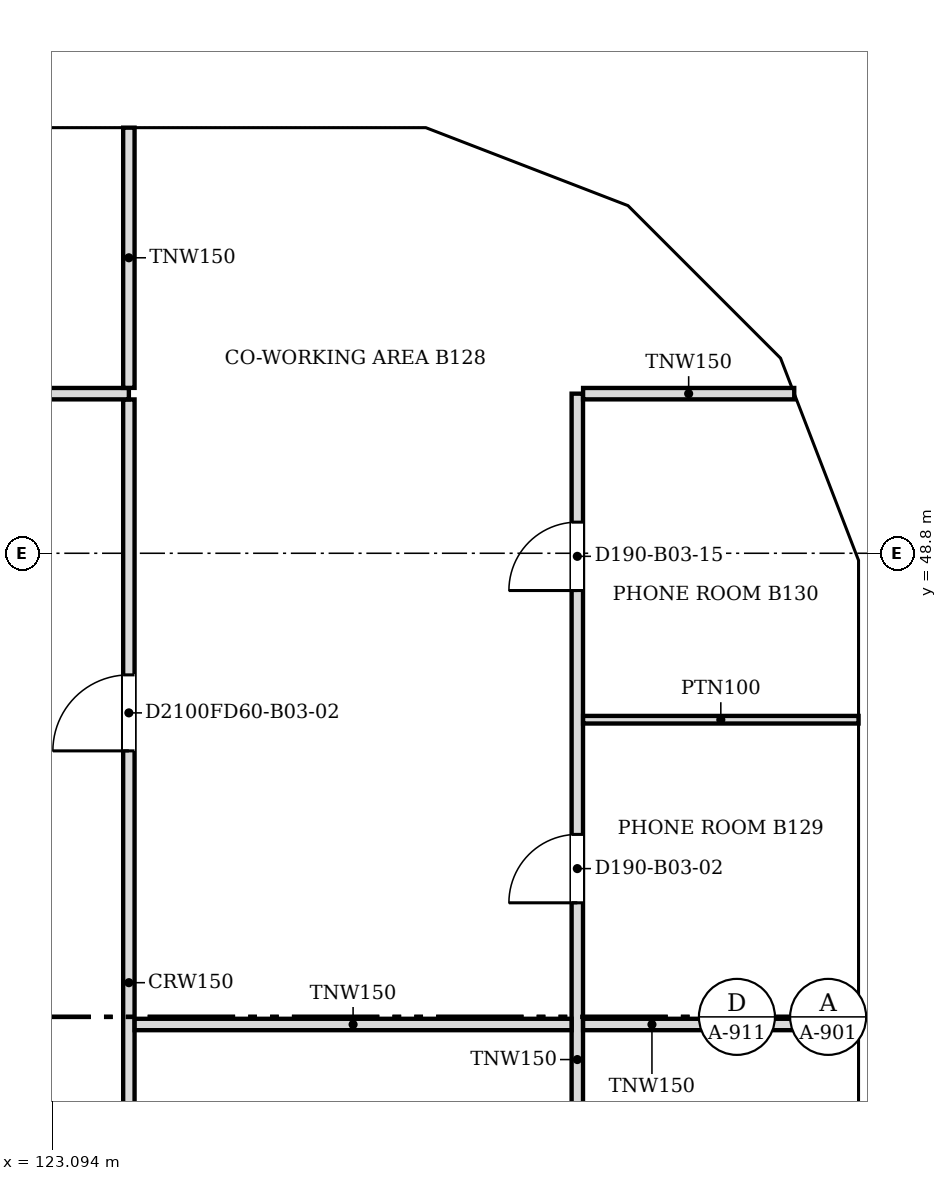
"""IFC4 building model, lengths in metres.
Left out: names, types, materials, properties, quantities, classifications, styles, units other than length and angle.
Written with IfcOpenShell. Run it as: python <this file> out.ifc"""

import sys

from ifc_helpers import new_model, si_unit, direction, frame, frame_2d, origin, place, context, subcontext, project, spatial, polyline, rectangle, outline, extrude, faceted_brep, source, transform, mapped, element, fill, save


model = new_model("IFC4")
c1 = context("Model", 3, precision=1e-05, world=origin(), true_north=direction((0.0, 1.0)))
c2 = subcontext(c1, "Body", "Model", "MODEL_VIEW")
j1 = project(units=[si_unit("LENGTHUNIT", "METRE"), si_unit("PLANEANGLEUNIT", "RADIAN")], contexts=[c1])
p1 = place(None, origin())
s1 = spatial("IfcSite", under=j1, at=p1, CompositionType="ELEMENT")
p2 = place(p1, origin())
s2 = spatial("IfcBuilding", under=s1, at=p2, CompositionType="ELEMENT")
p3 = place(p2, frame((0.0, 0.0, 33.4)))
s3 = spatial("IfcBuildingStorey", under=s2, at=p3, CompositionType="ELEMENT", Elevation=33.4)
m1 = source(origin(), c2, "Body", "Brep", [
    faceted_brep([(3.05, -0.25, 0.0), (6.1, -0.25, 3.8), (6.1, -0.25, 3.8), (3.05, -0.25, 7.6), (0.0, -0.25, 3.8), (0.0, 0.25, 3.8), (3.05, 0.25, 7.6), (6.1, 0.25, 3.8), (6.1, 0.25, 3.8), (3.05, 0.25, 0.0)], [[[0, 1, 2, 3, 4]], [[5, 6, 7, 8, 9]], [[9, 8, 1, 0]], [[7, 6, 3, 2]], [[6, 5, 4, 3]], [[5, 9, 0, 4]], [[1, 8, 7, 2]]]),
])
p4 = place(p3, frame((133.95, 36.6, -3.8), z_axis=(0.0, 0.0, 1.0), x_axis=(0.0, 1.0, 0.0)))
e1 = element("IfcWall", 1, at=p4, inside=s3, PredefinedType="SOLIDWALL", context=c2, shape_type="MappedRepresentation", body=[
    mapped(m1, transform((0.0, 0.0, 0.0), scale=1.0)),
])
m2 = source(origin(), c2, "Body", "SweptSolid", [
    extrude(outline(polyline([(3.05, 0.399), (5.78, 3.8), (3.05, 7.2), (0.321, 3.8), (3.05, 0.399)])), frame((0.0, 0.26, 0.0), z_axis=(0.0, -1.0, 0.0), x_axis=(1.0, 0.0, 0.0)), (0.0, 0.0, 1.0), 0.52),
])
p5 = place(p4, origin())
e2 = element("IfcOpeningElement", 2, at=p5, cuts=e1, PredefinedType="OPENING", context=c2, shape_type="MappedRepresentation", body=[
    mapped(m2, transform((0.0, 0.0, 0.0), scale=1.0)),
])
m3 = source(origin(), c2, "Body", "Brep", [
    faceted_brep([(3.05, -0.25, 0.0), (6.053, -0.25, 3.8), (3.05, -0.25, 7.6), (0.0, -0.25, 3.8), (0.0, 0.25, 3.8), (3.05, 0.25, 7.6), (6.007, 0.25, 3.859), (6.007, 0.25, 3.741), (3.05, 0.25, 0.0), (6.053, 0.0, 3.8)], [[[0, 1, 2, 3]], [[4, 5, 6, 7, 8]], [[8, 7, 9, 1, 0]], [[6, 5, 2, 1, 9]], [[5, 4, 3, 2]], [[4, 8, 0, 3]], [[9, 7, 6]]]),
])
p6 = place(p3, frame((133.95, 42.7, -3.8), z_axis=(0.0, 0.0, 1.0), x_axis=(0.0, 1.0, 0.0)))
e3 = element("IfcWall", 3, at=p6, inside=s3, PredefinedType="SOLIDWALL", context=c2, shape_type="MappedRepresentation", body=[
    mapped(m3, transform((0.0, 0.0, 0.0), scale=1.0)),
])
m4 = source(origin(), c2, "Body", "SweptSolid", [
    extrude(outline(polyline([(3.049, 0.401), (5.735, 3.8), (3.049, 7.199), (0.321, 3.8), (3.049, 0.401)])), frame((0.0, 0.26, 0.0), z_axis=(0.0, -1.0, 0.0), x_axis=(1.0, 0.0, 0.0)), (0.0, 0.0, 1.0), 0.52),
])
p7 = place(p6, origin())
e4 = element("IfcOpeningElement", 4, at=p7, cuts=e3, PredefinedType="OPENING", context=c2, shape_type="MappedRepresentation", body=[
    mapped(m4, transform((0.0, 0.0, 0.0), scale=1.0)),
])
m5 = source(origin(), c2, "Body", "Brep", [
    faceted_brep([(2.95, -0.25, 0.0), (3.003, -0.25, 0.068), (3.003, -0.25, 7.531), (2.95, -0.25, 7.6), (0.0, -0.25, 3.8), (0.047, 0.25, 3.86), (2.898, 0.25, 7.532), (2.898, 0.25, 0.068), (0.047, 0.25, 3.74), (2.95, 0.0, 0.0), (2.95, 0.0, 7.6), (0.0, 0.0, 3.8)], [[[0, 1, 2, 3, 4]], [[5, 6, 7, 8]], [[1, 0, 9]], [[10, 3, 2]], [[6, 5, 11, 4, 3, 10]], [[8, 7, 9, 0, 4, 11]], [[8, 11, 5]], [[1, 9, 7, 6, 10, 2]]]),
])
p8 = place(p3, frame((133.95, 48.753, -3.8), z_axis=(0.0, 0.0, 1.0), x_axis=(-0.359855894603, 0.933007896601, 0.0)))
e5 = element("IfcWall", 5, at=p8, inside=s3, PredefinedType="SOLIDWALL", context=c2, shape_type="MappedRepresentation", body=[
    mapped(m5, transform((0.0, 0.0, 0.0), scale=1.0)),
])
m6 = source(origin(), c2, "Body", "SweptSolid", [
    extrude(outline(polyline([(2.75, 6.935), (0.316, 3.8), (2.75, 0.665), (2.75, 6.935)])), frame((0.0, 0.26, 0.0), z_axis=(0.0, -1.0, 0.0), x_axis=(1.0, 0.0, 0.0)), (0.0, 0.0, 1.0), 0.52),
])
p9 = place(p8, origin())
e6 = element("IfcOpeningElement", 6, at=p9, cuts=e5, PredefinedType="OPENING", context=c2, shape_type="MappedRepresentation", body=[
    mapped(m6, transform((0.0, 0.0, 0.0), scale=1.0)),
])
m7 = source(origin(), c2, "Body", "Brep", [
    faceted_brep([(0.053, -0.25, 0.0), (2.997, -0.25, 3.8), (0.053, -0.25, 7.6), (0.0, -0.25, 7.532), (0.0, -0.25, 0.068), (0.106, 0.25, 7.531), (2.944, 0.25, 3.868), (2.944, 0.25, 3.732), (0.106, 0.25, 0.068), (2.997, 0.0, 3.8), (0.053, 0.0, 0.0), (0.053, 0.0, 7.6)], [[[0, 1, 2, 3, 4]], [[5, 6, 7, 8]], [[8, 7, 9, 1, 0, 10]], [[6, 5, 11, 2, 1, 9]], [[3, 2, 11]], [[10, 0, 4]], [[8, 10, 4, 3, 11, 5]], [[9, 7, 6]]]),
])
p10 = place(p3, frame((132.926, 51.469, -3.8), z_axis=(0.0, 0.0, 1.0), x_axis=(-0.707066050402, 0.707147509625, 0.0)))
e7 = element("IfcWall", 7, at=p10, inside=s3, PredefinedType="SOLIDWALL", context=c2, shape_type="MappedRepresentation", body=[
    mapped(m7, transform((0.0, 0.0, 0.0), scale=1.0)),
])
m8 = source(origin(), c2, "Body", "SweptSolid", [
    extrude(outline(polyline([(0.253, 0.666), (2.681, 3.8), (0.253, 6.934), (0.253, 0.666)])), frame((0.0, 0.26, 0.0), z_axis=(0.0, -1.0, 0.0), x_axis=(1.0, 0.0, 0.0)), (0.0, 0.0, 1.0), 0.52),
])
p11 = place(p10, origin())
e8 = element("IfcOpeningElement", 8, at=p11, cuts=e7, PredefinedType="OPENING", context=c2, shape_type="MappedRepresentation", body=[
    mapped(m8, transform((0.0, 0.0, 0.0), scale=1.0)),
])
m9 = source(origin(), c2, "Body", "Brep", [
    faceted_brep([(2.95, -0.25, 0.0), (2.997, -0.25, 0.059), (2.997, -0.25, 7.541), (2.95, -0.25, 7.6), (0.0, -0.25, 3.8), (0.053, 0.25, 3.868), (2.904, 0.25, 7.54), (2.904, 0.25, 0.06), (0.053, 0.25, 3.732), (2.95, 0.0, 0.0), (2.95, 0.0, 7.6), (0.0, 0.0, 3.8)], [[[0, 1, 2, 3, 4]], [[5, 6, 7, 8]], [[1, 0, 9]], [[10, 3, 2]], [[6, 5, 11, 4, 3, 10]], [[8, 7, 9, 0, 4, 11]], [[8, 11, 5]], [[1, 9, 7, 6, 10, 2]]]),
])
p12 = place(p3, frame((130.806, 53.588, -3.8), z_axis=(0.0, 0.0, 1.0), x_axis=(-0.932990326376, 0.359901446078, 0.0)))
e9 = element("IfcWall", 9, at=p12, inside=s3, PredefinedType="SOLIDWALL", context=c2, shape_type="MappedRepresentation", body=[
    mapped(m9, transform((0.0, 0.0, 0.0), scale=1.0)),
])
p13 = place(p12, origin())
e10 = element("IfcOpeningElement", 10, at=p13, cuts=e9, PredefinedType="OPENING", context=c2, shape_type="MappedRepresentation", body=[
    mapped(m6, transform((0.0, 0.0, 0.0), scale=1.0)),
])
m10 = source(origin(), c2, "Body", "Brep", [
    faceted_brep([(0.047, -0.25, 0.0), (3.05, -0.25, 3.8), (0.047, -0.25, 7.6), (0.0, -0.25, 7.54), (0.0, -0.25, 0.06), (0.093, 0.25, 7.541), (3.05, 0.25, 3.8), (0.093, 0.25, 0.059), (0.047, 0.0, 0.0), (0.047, 0.0, 7.6)], [[[0, 1, 2, 3, 4]], [[5, 6, 7]], [[7, 6, 1, 0, 8]], [[6, 5, 9, 2, 1]], [[3, 2, 9]], [[8, 0, 4]], [[7, 8, 4, 3, 9, 5]]]),
])
p14 = place(p3, frame((128.1, 54.65, -3.8), z_axis=(0.0, 0.0, 1.0), x_axis=(-1.0, 0.0, 0.0)))
e11 = element("IfcWall", 11, at=p14, inside=s3, PredefinedType="SOLIDWALL", context=c2, shape_type="MappedRepresentation", body=[
    mapped(m10, transform((0.0, 0.0, 0.0), scale=1.0)),
])
m11 = source(origin(), c2, "Body", "SweptSolid", [
    extrude(outline(polyline([(0.247, 0.656), (2.731, 3.8), (0.247, 6.944), (0.247, 0.656)])), frame((0.0, 0.26, 0.0), z_axis=(0.0, -1.0, 0.0), x_axis=(1.0, 0.0, 0.0)), (0.0, 0.0, 1.0), 0.52),
])
p15 = place(p14, origin())
e12 = element("IfcOpeningElement", 12, at=p15, cuts=e11, PredefinedType="OPENING", context=c2, shape_type="MappedRepresentation", body=[
    mapped(m11, transform((0.0, 0.0, 0.0), scale=1.0)),
])
m12 = source(origin(), c2, "Body", "SweptSolid", [
    extrude(outline(polyline([(3.05, 0.0), (6.1, 3.8), (3.05, 7.6), (0.0, 3.8), (3.05, 0.0)])), frame((0.0, 0.25, 0.0), z_axis=(0.0, -1.0, 0.0), x_axis=(1.0, 0.0, 0.0)), (0.0, 0.0, 1.0), 0.5),
])
p16 = place(p3, frame((125.05, 54.65, -3.8), z_axis=(0.0, 0.0, 1.0), x_axis=(-1.0, 0.0, 0.0)))
e13 = element("IfcWall", 13, at=p16, inside=s3, PredefinedType="SOLIDWALL", context=c2, shape_type="MappedRepresentation", body=[
    mapped(m12, transform((0.0, 0.0, 0.0), scale=1.0)),
])
p17 = place(p16, origin())
e14 = element("IfcOpeningElement", 14, at=p17, cuts=e13, PredefinedType="OPENING", context=c2, shape_type="MappedRepresentation", body=[
    mapped(m2, transform((0.0, 0.0, 0.0), scale=1.0)),
])
p18 = place(p2, frame((0.0, 0.0, 37.2)))
s4 = spatial("IfcBuildingStorey", under=s2, at=p18, CompositionType="ELEMENT", Elevation=37.2)
m13 = source(origin(), c2, "Body", "SweptSolid", [
    extrude(outline(polyline([(3.05, 0.0), (6.1, 3.8), (3.05, 7.6), (0.0, 3.8), (3.05, 0.0)])), frame((0.0, 0.25, 0.0), z_axis=(0.0, -1.0, 0.0), x_axis=(1.0, 0.0, 0.0)), (0.0, 0.0, 1.0), 0.5),
])
p19 = place(p18, frame((133.95, 39.65, -3.8), z_axis=(0.0, 0.0, 1.0), x_axis=(0.0, 1.0, 0.0)))
e15 = element("IfcWall", 15, at=p19, inside=s4, PredefinedType="SOLIDWALL", context=c2, shape_type="MappedRepresentation", body=[
    mapped(m13, transform((0.0, 0.0, 0.0), scale=1.0)),
])
m14 = source(origin(), c2, "Body", "SweptSolid", [
    extrude(outline(polyline([(3.05, 0.399), (5.78, 3.8), (3.05, 7.201), (0.321, 3.8), (3.05, 0.399)])), frame((0.0, 0.26, 0.0), z_axis=(0.0, -1.0, 0.0), x_axis=(1.0, 0.0, 0.0)), (0.0, 0.0, 1.0), 0.52),
])
p20 = place(p19, origin())
e16 = element("IfcOpeningElement", 16, at=p20, cuts=e15, PredefinedType="OPENING", context=c2, shape_type="MappedRepresentation", body=[
    mapped(m14, transform((0.0, 0.0, 0.0), scale=1.0)),
])
m15 = source(origin(), c2, "Body", "Brep", [
    faceted_brep([(3.003, -0.25, 0.0), (3.05, -0.25, 0.06), (3.05, -0.25, 7.54), (3.003, -0.25, 7.6), (0.0, -0.25, 3.8), (0.0, 0.25, 3.8), (2.957, 0.25, 7.541), (2.957, 0.25, 0.059), (3.003, 0.0, 0.0), (3.003, 0.0, 7.6)], [[[0, 1, 2, 3, 4]], [[5, 6, 7]], [[1, 0, 8]], [[9, 3, 2]], [[6, 5, 4, 3, 9]], [[5, 7, 8, 0, 4]], [[1, 8, 7, 6, 9, 2]]]),
])
p21 = place(p18, frame((133.95, 45.75, -3.8), z_axis=(0.0, 0.0, 1.0), x_axis=(0.0, 1.0, 0.0)))
e17 = element("IfcWall", 17, at=p21, inside=s4, PredefinedType="SOLIDWALL", context=c2, shape_type="MappedRepresentation", body=[
    mapped(m15, transform((0.0, 0.0, 0.0), scale=1.0)),
])
m16 = source(origin(), c2, "Body", "SweptSolid", [
    extrude(outline(polyline([(2.803, 6.944), (0.319, 3.8), (2.803, 0.656), (2.803, 6.944)])), frame((0.0, 0.26, 0.0), z_axis=(0.0, -1.0, 0.0), x_axis=(1.0, 0.0, 0.0)), (0.0, 0.0, 1.0), 0.52),
])
p22 = place(p21, origin())
e18 = element("IfcOpeningElement", 18, at=p22, cuts=e17, PredefinedType="OPENING", context=c2, shape_type="MappedRepresentation", body=[
    mapped(m16, transform((0.0, 0.0, 0.0), scale=1.0)),
])
m17 = source(origin(), c2, "Body", "Brep", [
    faceted_brep([(0.047, -0.25, 0.0), (2.997, -0.25, 3.8), (0.047, -0.25, 7.6), (0.0, -0.25, 7.541), (0.0, -0.25, 0.059), (0.093, 0.25, 7.54), (2.944, 0.25, 3.868), (2.944, 0.25, 3.732), (0.093, 0.25, 0.06), (2.997, 0.0, 3.8), (0.047, 0.0, 0.0), (0.047, 0.0, 7.6)], [[[0, 1, 2, 3, 4]], [[5, 6, 7, 8]], [[8, 7, 9, 1, 0, 10]], [[6, 5, 11, 2, 1, 9]], [[3, 2, 11]], [[10, 0, 4]], [[8, 10, 4, 3, 11, 5]], [[9, 7, 6]]]),
])
p23 = place(p18, frame((133.967, 48.71, -3.8), z_axis=(0.0, 0.0, 1.0), x_axis=(-0.359901446078, 0.932990326376, 0.0)))
e19 = element("IfcWall", 19, at=p23, inside=s4, PredefinedType="SOLIDWALL", context=c2, shape_type="MappedRepresentation", body=[
    mapped(m17, transform((0.0, 0.0, 0.0), scale=1.0)),
])
m18 = source(origin(), c2, "Body", "SweptSolid", [
    extrude(outline(polyline([(0.247, 0.665), (2.681, 3.8), (0.247, 6.935), (0.247, 0.665)])), frame((0.0, 0.26, 0.0), z_axis=(0.0, -1.0, 0.0), x_axis=(1.0, 0.0, 0.0)), (0.0, 0.0, 1.0), 0.52),
])
p24 = place(p23, origin())
e20 = element("IfcOpeningElement", 20, at=p24, cuts=e19, PredefinedType="OPENING", context=c2, shape_type="MappedRepresentation", body=[
    mapped(m18, transform((0.0, 0.0, 0.0), scale=1.0)),
])
m19 = source(origin(), c2, "Body", "Brep", [
    faceted_brep([(2.944, -0.25, 0.0), (2.997, -0.25, 0.068), (2.997, -0.25, 7.532), (2.944, -0.25, 7.6), (0.0, -0.25, 3.8), (0.053, 0.25, 3.868), (2.891, 0.25, 7.532), (2.891, 0.25, 0.068), (0.053, 0.25, 3.732), (2.944, 0.0, 0.0), (2.944, 0.0, 7.6), (0.0, 0.0, 3.8)], [[[0, 1, 2, 3, 4]], [[5, 6, 7, 8]], [[1, 0, 9]], [[10, 3, 2]], [[6, 5, 11, 4, 3, 10]], [[8, 7, 9, 0, 4, 11]], [[8, 11, 5]], [[1, 9, 7, 6, 10, 2]]]),
])
p25 = place(p18, frame((132.888, 51.506, -3.8), z_axis=(0.0, 0.0, 1.0), x_axis=(-0.707147509625, 0.707066050402, 0.0)))
e21 = element("IfcWall", 21, at=p25, inside=s4, PredefinedType="SOLIDWALL", context=c2, shape_type="MappedRepresentation", body=[
    mapped(m19, transform((0.0, 0.0, 0.0), scale=1.0)),
])
m20 = source(origin(), c2, "Body", "SweptSolid", [
    extrude(outline(polyline([(2.744, 6.934), (0.316, 3.8), (2.744, 0.667), (2.744, 6.934)])), frame((0.0, 0.26, 0.0), z_axis=(0.0, -1.0, 0.0), x_axis=(1.0, 0.0, 0.0)), (0.0, 0.0, 1.0), 0.52),
])
p26 = place(p25, origin())
e22 = element("IfcOpeningElement", 22, at=p26, cuts=e21, PredefinedType="OPENING", context=c2, shape_type="MappedRepresentation", body=[
    mapped(m20, transform((0.0, 0.0, 0.0), scale=1.0)),
])
m21 = source(origin(), c2, "Body", "Brep", [
    faceted_brep([(0.053, -0.25, 0.0), (3.003, -0.25, 3.8), (0.053, -0.25, 7.6), (0.0, -0.25, 7.532), (0.0, -0.25, 0.068), (0.106, 0.25, 7.532), (2.957, 0.25, 3.86), (2.957, 0.25, 3.74), (0.106, 0.25, 0.068), (3.003, 0.0, 3.8), (0.053, 0.0, 0.0), (0.053, 0.0, 7.6)], [[[0, 1, 2, 3, 4]], [[5, 6, 7, 8]], [[8, 7, 9, 1, 0, 10]], [[6, 5, 11, 2, 1, 9]], [[3, 2, 11]], [[10, 0, 4]], [[8, 10, 4, 3, 11, 5]], [[9, 7, 6]]]),
])
p27 = place(p18, frame((130.856, 53.569, -3.8), z_axis=(0.0, 0.0, 1.0), x_axis=(-0.933007896601, 0.359855894603, 0.0)))
e23 = element("IfcWall", 23, at=p27, inside=s4, PredefinedType="SOLIDWALL", context=c2, shape_type="MappedRepresentation", body=[
    mapped(m21, transform((0.0, 0.0, 0.0), scale=1.0)),
])
m22 = source(origin(), c2, "Body", "SweptSolid", [
    extrude(outline(polyline([(0.253, 0.665), (2.687, 3.8), (0.253, 6.935), (0.253, 0.665)])), frame((0.0, 0.26, 0.0), z_axis=(0.0, -1.0, 0.0), x_axis=(1.0, 0.0, 0.0)), (0.0, 0.0, 1.0), 0.52),
])
p28 = place(p27, origin())
e24 = element("IfcOpeningElement", 24, at=p28, cuts=e23, PredefinedType="OPENING", context=c2, shape_type="MappedRepresentation", body=[
    mapped(m22, transform((0.0, 0.0, 0.0), scale=1.0)),
])
m23 = source(origin(), c2, "Body", "Brep", [
    faceted_brep([(3.003, -0.25, 0.0), (6.053, -0.25, 3.8), (3.003, -0.25, 7.6), (0.0, -0.25, 3.8), (0.047, 0.25, 3.859), (3.003, 0.25, 7.6), (6.053, 0.25, 3.8), (3.003, 0.25, 0.0), (0.047, 0.25, 3.741), (0.0, 0.0, 3.8)], [[[0, 1, 2, 3]], [[4, 5, 6, 7, 8]], [[7, 6, 1, 0]], [[6, 5, 2, 1]], [[5, 4, 9, 3, 2]], [[8, 7, 0, 3, 9]], [[8, 9, 4]]]),
])
p29 = place(p18, frame((128.053, 54.65, -3.8), z_axis=(0.0, 0.0, 1.0), x_axis=(-1.0, 0.0, 0.0)))
e25 = element("IfcWall", 25, at=p29, inside=s4, PredefinedType="SOLIDWALL", context=c2, shape_type="MappedRepresentation", body=[
    mapped(m23, transform((0.0, 0.0, 0.0), scale=1.0)),
])
m24 = source(origin(), c2, "Body", "SweptSolid", [
    extrude(outline(polyline([(3.005, 0.401), (5.733, 3.8), (3.005, 7.199), (0.319, 3.8), (3.005, 0.401)])), frame((0.0, 0.26, 0.0), z_axis=(0.0, -1.0, 0.0), x_axis=(1.0, 0.0, 0.0)), (0.0, 0.0, 1.0), 0.52),
])
p30 = place(p29, origin())
e26 = element("IfcOpeningElement", 26, at=p30, cuts=e25, PredefinedType="OPENING", context=c2, shape_type="MappedRepresentation", body=[
    mapped(m24, transform((0.0, 0.0, 0.0), scale=1.0)),
])
p31 = place(p3, frame((124.1, 50.824, 0.0), z_axis=(0.0, 0.0, 1.0), x_axis=(0.0, -1.0, 0.0)))
e27 = element("IfcWall", 27, at=p31, inside=s3, PredefinedType="PARTITIONING", context=c2, shape_type="SweptSolid", body=[
    extrude(rectangle(XDim=14.224, YDim=0.15, at=frame_2d((7.112, 0.0))), origin(), (0.0, 0.0, 1.0), 3.067),
])
m25 = source(origin(), c2, "Body", "SweptSolid", [
    extrude(rectangle(XDim=1.0, YDim=2.1, at=frame_2d((0.5, 1.05))), frame((0.0, 0.085, 0.0), z_axis=(0.0, -1.0, 0.0), x_axis=(1.0, 0.0, 0.0)), (0.0, 0.0, 1.0), 0.17),
])
p32 = place(p31, frame((3.624, 0.0, 0.0)))
e28 = element("IfcOpeningElement", 28, at=p32, cuts=e27, PredefinedType="OPENING", context=c2, shape_type="MappedRepresentation", body=[
    mapped(m25, transform((0.0, 0.0, 0.0), scale=1.0)),
])
p33 = place(p31, frame((10.724, 0.0, 0.0)))
e29 = element("IfcOpeningElement", 29, at=p33, cuts=e27, PredefinedType="OPENING", context=c2, shape_type="MappedRepresentation", body=[
    mapped(m25, transform((0.0, 0.0, 0.0), scale=1.0)),
])
p34 = place(p3, frame((130.0, 50.9, 0.0), z_axis=(0.0, 0.0, 1.0), x_axis=(0.0, -1.0, 0.0)))
e30 = element("IfcWall", 30, at=p34, inside=s3, PredefinedType="PARTITIONING", context=c2, shape_type="SweptSolid", body=[
    extrude(rectangle(XDim=14.224, YDim=0.15, at=frame_2d((7.112, 0.0))), origin(), (0.0, 0.0, 1.0), 3.067),
])
m26 = source(origin(), c2, "Body", "SweptSolid", [
    extrude(rectangle(XDim=0.9, YDim=2.1, at=frame_2d((0.45, 1.05))), frame((0.0, 0.085, 0.0), z_axis=(0.0, -1.0, 0.0), x_axis=(1.0, 0.0, 0.0)), (0.0, 0.0, 1.0), 0.17),
])
p35 = place(p34, frame((5.799, 0.0, 0.0)))
e31 = element("IfcOpeningElement", 31, at=p35, cuts=e30, PredefinedType="OPENING", context=c2, shape_type="MappedRepresentation", body=[
    mapped(m26, transform((0.0, 0.0, 0.0), scale=1.0)),
])
p36 = place(p34, frame((10.824, 0.0, 0.0)))
e32 = element("IfcOpeningElement", 32, at=p36, cuts=e30, PredefinedType="OPENING", context=c2, shape_type="MappedRepresentation", body=[
    mapped(m26, transform((0.0, 0.0, 0.0), scale=1.0)),
])
p37 = place(p34, frame((1.69, 0.0, 0.0)))
e33 = element("IfcOpeningElement", 33, at=p37, cuts=e30, PredefinedType="OPENING", context=c2, shape_type="MappedRepresentation", body=[
    mapped(m26, transform((0.0, 0.0, 0.0), scale=1.0)),
])
p38 = place(p3, frame((124.176, 42.6, 0.0), z_axis=(0.0, 0.0, 1.0), x_axis=(1.0, 0.0, 0.0)))
e34 = element("IfcWall", 34, at=p38, inside=s3, PredefinedType="PARTITIONING", context=c2, shape_type="SweptSolid", body=[
    extrude(rectangle(XDim=5.748, YDim=0.15, at=frame_2d((2.874, 0.0))), origin(), (0.0, 0.0, 1.0), 3.067),
])
p39 = place(p3, frame((130.076, 42.6, 0.0), z_axis=(0.0, 0.0, 1.0), x_axis=(1.0, 0.0, 0.0)))
e35 = element("IfcWall", 35, at=p39, inside=s3, PredefinedType="PARTITIONING", context=c2, shape_type="SweptSolid", body=[
    extrude(rectangle(XDim=3.624, YDim=0.15, at=frame_2d((1.812, 0.0))), origin(), (0.0, 0.0, 1.0), 3.067),
])
p40 = place(p3, frame((130.076, 46.61, 0.0), z_axis=(0.0, 0.0, 1.0), x_axis=(1.0, 0.0, 0.0)))
e36 = element("IfcWall", 36, at=p40, inside=s3, PredefinedType="PARTITIONING", context=c2, shape_type="SweptSolid", body=[
    extrude(rectangle(XDim=3.624, YDim=0.1, at=frame_2d((1.812, 0.0))), origin(), (0.0, 0.0, 1.0), 3.067),
])
p41 = place(p3, frame((108.5, 50.9, 0.0), z_axis=(0.0, 0.0, 1.0), x_axis=(1.0, 0.0, 0.0)))
e37 = element("IfcWall", 37, at=p41, inside=s3, PredefinedType="PARTITIONING", context=c2, shape_type="SweptSolid", body=[
    extrude(rectangle(XDim=15.6, YDim=0.15, at=frame_2d((7.8, 0.0))), origin(), (0.0, 0.0, 1.0), 3.067),
])
p42 = place(p41, frame((7.3, 0.0, 0.0)))
e38 = element("IfcOpeningElement", 38, at=p42, cuts=e37, PredefinedType="OPENING", context=c2, shape_type="MappedRepresentation", body=[
    mapped(m25, transform((0.0, 0.0, 0.0), scale=1.0)),
])
p43 = place(p3, frame((130.076, 50.9, 0.0), z_axis=(0.0, 0.0, 1.0), x_axis=(1.0, 0.0, 0.0)))
e39 = element("IfcWall", 39, at=p43, inside=s3, PredefinedType="PARTITIONING", context=c2, shape_type="SweptSolid", body=[
    extrude(rectangle(XDim=2.778, YDim=0.15, at=frame_2d((1.389, 0.0))), origin(), (0.0, 0.0, 1.0), 3.067),
])
p44 = place(p3, frame((124.1, 50.976, 0.0), z_axis=(0.0, 0.0, 1.0), x_axis=(0.0, 1.0, 0.0)))
e40 = element("IfcWall", 40, at=p44, inside=s3, PredefinedType="PARTITIONING", context=c2, shape_type="SweptSolid", body=[
    extrude(rectangle(XDim=3.424, YDim=0.15, at=frame_2d((1.712, 0.0))), origin(), (0.0, 0.0, 1.0), 3.067),
])
m27 = source(origin(), c2, "Body", "SweptSolid", [
    extrude(rectangle(XDim=0.9, YDim=2.1, at=frame_2d((0.45, 1.05))), frame((0.0, 0.025, 0.0), z_axis=(0.0, -1.0, 0.0), x_axis=(1.0, 0.0, 0.0)), (0.0, 0.0, 1.0), 0.05),
])
p45 = place(p35, origin())
e41 = element("IfcDoor", 41, at=p45, inside=s3, OperationType="SINGLE_SWING_RIGHT", PredefinedType="DOOR", context=c2, shape_type="MappedRepresentation", body=[
    mapped(m27, transform((0.0, 0.0, 0.0), scale=1.0)),
])
fill(e31, e41)
p46 = place(p37, origin())
e42 = element("IfcDoor", 42, at=p46, inside=s3, OperationType="SINGLE_SWING_RIGHT", PredefinedType="DOOR", context=c2, shape_type="MappedRepresentation", body=[
    mapped(m27, transform((0.0, 0.0, 0.0), scale=1.0)),
])
fill(e33, e42)
m28 = source(origin(), c2, "Body", "SweptSolid", [
    extrude(rectangle(XDim=1.0, YDim=2.1, at=frame_2d((0.5, 1.05))), frame((0.0, 0.025, 0.0), z_axis=(0.0, -1.0, 0.0), x_axis=(1.0, 0.0, 0.0)), (0.0, 0.0, 1.0), 0.05),
])
p47 = place(p32, origin())
e43 = element("IfcDoor", 43, at=p47, inside=s3, OperationType="SINGLE_SWING_RIGHT", PredefinedType="DOOR", context=c2, shape_type="MappedRepresentation", body=[
    mapped(m28, transform((0.0, 0.0, 0.0), scale=1.0)),
])
fill(e28, e43)
save(model, sys.argv[1])
